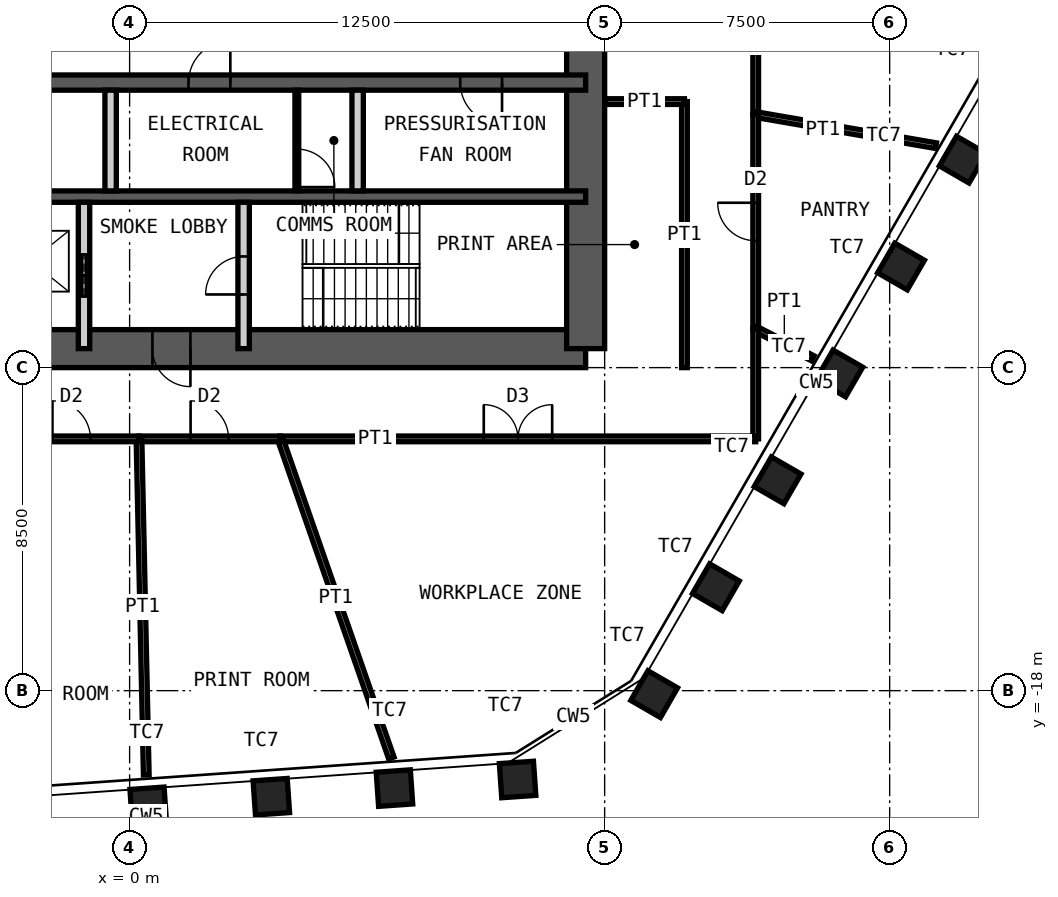
"""IFC4 building model, lengths in metres.
Left out: names, types, materials, properties, quantities, classifications, styles, units other than length and angle.
Written with IfcOpenShell. Run it as: python <this file> out.ifc"""

import sys

from ifc_helpers import new_model, si_unit, direction, frame, frame_2d, origin, origin_2d, place, context, subcontext, project, spatial, rectangle, hollow_rectangle, extrude, element, fill, save


model = new_model("IFC4")
c1 = context("Model", 3, precision=1e-05, world=origin(), true_north=direction((0.0, 1.0)))
c2 = subcontext(c1, "Body", "Model", "MODEL_VIEW")
j1 = project(units=[si_unit("LENGTHUNIT", "METRE"), si_unit("PLANEANGLEUNIT", "RADIAN")], contexts=[c1])
p1 = place(None, origin())
s1 = spatial("IfcSite", under=j1, at=p1, CompositionType="ELEMENT")
p2 = place(p1, origin())
s2 = spatial("IfcBuilding", under=s1, at=p2, CompositionType="ELEMENT")
p3 = place(p2, frame((0.0, 0.0, 266.2)))
s3 = spatial("IfcBuildingStorey", under=s2, at=p3, CompositionType="ELEMENT", Elevation=266.2)
for number, where, z_axis, x_axis in (
    (1, (21.924, -4.027, 0.0), (0.0, 0.0, 1.0), (0.5, 0.866, 0.0)),
    (2, (20.3, -6.84, 0.0), (0.0, 0.0, 1.0), (0.5, 0.866, 0.0)),
    (3, (18.676, -9.653, 0.0), (0.0, 0.0, 1.0), (0.5, 0.866, 0.0)),
    (4, (17.052, -12.466, 0.0), (0.0, 0.0, 1.0), (0.5, 0.866, 0.0)),
    (5, (15.427, -15.279, 0.0), (0.0, 0.0, 1.0), (0.5, 0.866, 0.0)),
    (6, (13.803, -18.092, 0.0), (0.0, 0.0, 1.0), (0.5, 0.866, 0.0)),
    (7, (10.209, -20.337, 0.0), (0.0, 0.0, 1.0), (0.998, 0.07, 0.0)),
    (8, (6.969, -20.564, 0.0), (0.0, 0.0, 1.0), (0.998, 0.07, 0.0)),
    (9, (3.729, -20.791, 0.0), (0.0, 0.0, 1.0), (0.998, 0.07, 0.0)),
    (10, (0.489, -21.017, 0.0), (0.0, 0.0, 1.0), (0.998, 0.07, 0.0)),
):
    element("IfcColumn", number, at=place(p3, frame(where, z_axis=z_axis, x_axis=x_axis)), inside=s3, PredefinedType="COLUMN", context=c2, shape_type="SweptSolid", body=[
        extrude(hollow_rectangle(XDim=0.9, YDim=0.9, WallThickness=0.06, at=origin_2d()), origin(), (0.0, 0.0, 1.0), 4.2),
    ])
p4 = place(p3, frame((-12.0, -9.0, 0.0), z_axis=(0.0, 0.0, 1.0), x_axis=(1.0, 0.0, 0.0)))
e11 = element("IfcWall", 11, at=p4, inside=s3, PredefinedType="SHEAR", context=c2, shape_type="SweptSolid", body=[
    extrude(rectangle(XDim=24.0, YDim=1.0, at=frame_2d((12.0, 0.0))), origin(), (0.0, 0.0, 1.0), 4.2),
])
p5 = place(p4, frame((1.35, 0.0, 0.0)))
e12 = element("IfcOpeningElement", 12, at=p5, cuts=e11, PredefinedType="OPENING", context=c2, shape_type="SweptSolid", body=[
    extrude(rectangle(XDim=1.0, YDim=2.1, at=frame_2d((0.5, 1.05))), frame((0.0, 0.51, 0.0), z_axis=(0.0, -1.0, 0.0), x_axis=(1.0, 0.0, 0.0)), (0.0, 0.0, 1.0), 1.02),
])
p6 = place(p4, frame((5.325, 0.0, 0.0)))
e13 = element("IfcOpeningElement", 13, at=p6, cuts=e11, PredefinedType="OPENING", context=c2, shape_type="SweptSolid", body=[
    extrude(rectangle(XDim=1.15, YDim=2.1, at=frame_2d((0.575, 1.05))), frame((0.0, 0.51, 0.0), z_axis=(0.0, -1.0, 0.0), x_axis=(1.0, 0.0, 0.0)), (0.0, 0.0, 1.0), 1.02),
])
p7 = place(p4, frame((12.6, 0.0, 0.0)))
e14 = element("IfcOpeningElement", 14, at=p7, cuts=e11, PredefinedType="OPENING", context=c2, shape_type="SweptSolid", body=[
    extrude(rectangle(XDim=1.0, YDim=2.1, at=frame_2d((0.5, 1.05))), frame((0.0, 0.51, 0.0), z_axis=(0.0, -1.0, 0.0), x_axis=(1.0, 0.0, 0.0)), (0.0, 0.0, 1.0), 1.02),
])
p8 = place(p3, frame((12.0, -9.0, 0.0), z_axis=(0.0, 0.0, 1.0), x_axis=(0.0, 1.0, 0.0)))
e15 = element("IfcWall", 15, at=p8, inside=s3, PredefinedType="SHEAR", context=c2, shape_type="SweptSolid", body=[
    extrude(rectangle(XDim=18.0, YDim=1.0, at=frame_2d((9.0, 0.0))), origin(), (0.0, 0.0, 1.0), 4.2),
])
p9 = place(p8, frame((8.1, 0.0, 0.0)))
e16 = element("IfcOpeningElement", 16, at=p9, cuts=e15, PredefinedType="OPENING", context=c2, shape_type="SweptSolid", body=[
    extrude(rectangle(XDim=1.8, YDim=2.1, at=frame_2d((0.9, 1.05))), frame((0.0, 0.51, 0.0), z_axis=(0.0, -1.0, 0.0), x_axis=(1.0, 0.0, 0.0)), (0.0, 0.0, 1.0), 1.02),
])
p10 = place(p3, frame((-12.0, -2.0, 0.0), z_axis=(0.0, 0.0, 1.0), x_axis=(1.0, 0.0, 0.0)))
e17 = element("IfcWall", 17, at=p10, inside=s3, PredefinedType="SHEAR", context=c2, shape_type="SweptSolid", body=[
    extrude(rectangle(XDim=24.0, YDim=0.4, at=frame_2d((12.0, 0.0))), origin(), (0.0, 0.0, 1.0), 4.2),
])
p11 = place(p10, frame((1.1, 0.0, 0.0)))
e18 = element("IfcOpeningElement", 18, at=p11, cuts=e17, PredefinedType="OPENING", context=c2, shape_type="SweptSolid", body=[
    extrude(rectangle(XDim=1.1, YDim=2.1, at=frame_2d((0.55, 1.05))), frame((0.0, 0.21, 0.0), z_axis=(0.0, -1.0, 0.0), x_axis=(1.0, 0.0, 0.0)), (0.0, 0.0, 1.0), 0.42),
])
p12 = place(p10, frame((13.55, 0.0, 0.0)))
e19 = element("IfcOpeningElement", 19, at=p12, cuts=e17, PredefinedType="OPENING", context=c2, shape_type="SweptSolid", body=[
    extrude(rectangle(XDim=1.1, YDim=2.1, at=frame_2d((0.55, 1.05))), frame((0.0, 0.21, 0.0), z_axis=(0.0, -1.0, 0.0), x_axis=(1.0, 0.0, 0.0)), (0.0, 0.0, 1.0), 0.42),
])
p13 = place(p10, frame((20.7, 0.0, 0.0)))
e20 = element("IfcOpeningElement", 20, at=p13, cuts=e17, PredefinedType="OPENING", context=c2, shape_type="SweptSolid", body=[
    extrude(rectangle(XDim=1.1, YDim=2.1, at=frame_2d((0.55, 1.05))), frame((0.0, 0.21, 0.0), z_axis=(0.0, -1.0, 0.0), x_axis=(1.0, 0.0, 0.0)), (0.0, 0.0, 1.0), 0.42),
])
p14 = place(p10, frame((4.0, 0.0, 0.0)))
e21 = element("IfcOpeningElement", 21, at=p14, cuts=e17, PredefinedType="OPENING", context=c2, shape_type="SweptSolid", body=[
    extrude(rectangle(XDim=1.0, YDim=2.1, at=frame_2d((0.5, 1.05))), frame((0.0, 0.21, 0.0), z_axis=(0.0, -1.0, 0.0), x_axis=(1.0, 0.0, 0.0)), (0.0, 0.0, 1.0), 0.42),
])
p15 = place(p10, frame((6.8, 0.0, 0.0)))
e22 = element("IfcOpeningElement", 22, at=p15, cuts=e17, PredefinedType="OPENING", context=c2, shape_type="SweptSolid", body=[
    extrude(rectangle(XDim=1.0, YDim=2.1, at=frame_2d((0.5, 1.05))), frame((0.0, 0.21, 0.0), z_axis=(0.0, -1.0, 0.0), x_axis=(1.0, 0.0, 0.0)), (0.0, 0.0, 1.0), 0.42),
])
p16 = place(p3, frame((-12.0, -5.0, 0.0), z_axis=(0.0, 0.0, 1.0), x_axis=(1.0, 0.0, 0.0)))
e23 = element("IfcWall", 23, at=p16, inside=s3, PredefinedType="SHEAR", context=c2, shape_type="SweptSolid", body=[
    extrude(rectangle(XDim=24.0, YDim=0.3, at=frame_2d((12.0, 0.0))), origin(), (0.0, 0.0, 1.0), 4.2),
])
for number, where, z_axis, x_axis in (
    (24, (-0.5, -4.85, 0.0), (0.0, 0.0, 1.0), (0.0, 1.0, 0.0)),
    (25, (6.0, -4.85, 0.0), (0.0, 0.0, 1.0), (0.0, 1.0, 0.0)),
):
    element("IfcWall", number, at=place(p3, frame(where, z_axis=z_axis, x_axis=x_axis)), inside=s3, PredefinedType="PARTITIONING", context=c2, shape_type="SweptSolid", body=[
        extrude(rectangle(XDim=2.65, YDim=0.3, at=frame_2d((1.325, 0.0))), origin(), (0.0, 0.0, 1.0), 3.98),
    ])
p17 = place(p3, frame((-1.2, -9.0, 0.0), z_axis=(0.0, 0.0, 1.0), x_axis=(0.0, 1.0, 0.0)))
e26 = element("IfcWall", 26, at=p17, inside=s3, PredefinedType="PARTITIONING", context=c2, shape_type="SweptSolid", body=[
    extrude(rectangle(XDim=3.85, YDim=0.3, at=frame_2d((1.925, 0.0))), origin(), (0.0, 0.0, 1.0), 3.98),
])
p18 = place(p17, frame((1.375, 0.0, 0.0)))
e27 = element("IfcOpeningElement", 27, at=p18, cuts=e26, PredefinedType="OPENING", context=c2, shape_type="SweptSolid", body=[
    extrude(rectangle(XDim=1.1, YDim=2.4, at=frame_2d((0.55, 1.2))), frame((0.0, 0.16, 0.0), z_axis=(0.0, -1.0, 0.0), x_axis=(1.0, 0.0, 0.0)), (0.0, 0.0, 1.0), 0.32),
])
p19 = place(p3, frame((3.0, -9.0, 0.0), z_axis=(0.0, 0.0, 1.0), x_axis=(0.0, 1.0, 0.0)))
e28 = element("IfcWall", 28, at=p19, inside=s3, PredefinedType="PARTITIONING", context=c2, shape_type="SweptSolid", body=[
    extrude(rectangle(XDim=3.85, YDim=0.3, at=frame_2d((1.925, 0.0))), origin(), (0.0, 0.0, 1.0), 3.98),
])
p20 = place(p19, frame((1.425, 0.0, 0.0)))
e29 = element("IfcOpeningElement", 29, at=p20, cuts=e28, PredefinedType="OPENING", context=c2, shape_type="SweptSolid", body=[
    extrude(rectangle(XDim=1.0, YDim=2.1, at=frame_2d((0.5, 1.05))), frame((0.0, 0.16, 0.0), z_axis=(0.0, -1.0, 0.0), x_axis=(1.0, 0.0, 0.0)), (0.0, 0.0, 1.0), 0.32),
])
p21 = place(p3, frame((4.4, -4.85, 0.0), z_axis=(0.0, 0.0, 1.0), x_axis=(0.0, 1.0, 0.0)))
e30 = element("IfcWall", 30, at=p21, inside=s3, PredefinedType="PARTITIONING", context=c2, shape_type="SweptSolid", body=[
    extrude(rectangle(XDim=2.65, YDim=0.1, at=frame_2d((1.325, 0.0))), origin(), (0.0, 0.0, 1.0), 3.98),
])
p22 = place(p21, frame((0.1, 0.0, 0.0)))
e31 = element("IfcOpeningElement", 31, at=p22, cuts=e30, PredefinedType="OPENING", context=c2, shape_type="SweptSolid", body=[
    extrude(rectangle(XDim=1.0, YDim=2.4, at=frame_2d((0.5, 1.2))), frame((0.0, 0.06, 0.0), z_axis=(0.0, -1.0, 0.0), x_axis=(1.0, 0.0, 0.0)), (0.0, 0.0, 1.0), 0.12),
])
p23 = place(p3, frame((16.475, 6.737, 0.0), z_axis=(0.0, 0.0, 1.0), x_axis=(0.0, -1.0, 0.0)))
e32 = element("IfcWall", 32, at=p23, inside=s3, PredefinedType="PARTITIONING", context=c2, shape_type="SweptSolid", body=[
    extrude(rectangle(XDim=9.578, YDim=0.15, at=frame_2d((4.789, 0.0))), origin(), (0.0, 0.0, 1.0), 4.03),
])
p24 = place(p23, frame((3.889, 0.0, 0.0)))
e33 = element("IfcOpeningElement", 33, at=p24, cuts=e32, PredefinedType="OPENING", context=c2, shape_type="SweptSolid", body=[
    extrude(rectangle(XDim=1.8, YDim=2.4, at=frame_2d((0.9, 1.2))), frame((0.0, 0.085, 0.0), z_axis=(0.0, -1.0, 0.0), x_axis=(1.0, 0.0, 0.0)), (0.0, 0.0, 1.0), 0.17),
])
p25 = place(p3, frame((21.219, -3.66, 0.0), z_axis=(0.0, 0.0, 1.0), x_axis=(-0.985444592587, 0.16999692627, 0.0)))
e34 = element("IfcWall", 34, at=p25, inside=s3, PredefinedType="PARTITIONING", context=c2, shape_type="SweptSolid", body=[
    extrude(rectangle(XDim=4.814, YDim=0.15, at=frame_2d((2.407, 0.0))), origin(), (0.0, 0.0, 1.0), 4.03),
])
p26 = place(p3, frame((16.475, -2.842, 0.0), z_axis=(0.0, 0.0, 1.0), x_axis=(0.0, -1.0, 0.0)))
e35 = element("IfcWall", 35, at=p26, inside=s3, PredefinedType="PARTITIONING", context=c2, shape_type="SweptSolid", body=[
    extrude(rectangle(XDim=5.64, YDim=0.15, at=frame_2d((2.82, 0.0))), origin(), (0.0, 0.0, 1.0), 4.03),
])
p27 = place(p26, frame((2.32, 0.0, 0.0)))
e36 = element("IfcOpeningElement", 36, at=p27, cuts=e35, PredefinedType="OPENING", context=c2, shape_type="SweptSolid", body=[
    extrude(rectangle(XDim=1.0, YDim=2.4, at=frame_2d((0.5, 1.2))), frame((0.0, 0.085, 0.0), z_axis=(0.0, -1.0, 0.0), x_axis=(1.0, 0.0, 0.0)), (0.0, 0.0, 1.0), 0.17),
])
p28 = place(p3, frame((17.98, -9.257, 0.0), z_axis=(0.0, 0.0, 1.0), x_axis=(-0.889058145064, 0.457794292991, 0.0)))
e37 = element("IfcWall", 37, at=p28, inside=s3, PredefinedType="PARTITIONING", context=c2, shape_type="SweptSolid", body=[
    extrude(rectangle(XDim=1.693, YDim=0.15, at=frame_2d((0.847, 0.0))), origin(), (0.0, 0.0, 1.0), 3.33),
])
p29 = place(p3, frame((16.475, -8.482, 0.0), z_axis=(0.0, 0.0, 1.0), x_axis=(0.0, -1.0, 0.0)))
e38 = element("IfcWall", 38, at=p29, inside=s3, PredefinedType="PARTITIONING", context=c2, shape_type="SweptSolid", body=[
    extrude(rectangle(XDim=2.893, YDim=0.15, at=frame_2d((1.447, 0.0))), origin(), (0.0, 0.0, 1.0), 4.03),
])
p30 = place(p3, frame((16.475, -11.375, 0.0), z_axis=(0.0, 0.0, 1.0), x_axis=(-1.0, 0.0, 0.0)))
e39 = element("IfcWall", 39, at=p30, inside=s3, PredefinedType="PARTITIONING", context=c2, shape_type="SweptSolid", body=[
    extrude(rectangle(XDim=12.512, YDim=0.15, at=frame_2d((6.256, 0.0))), origin(), (0.0, 0.0, 1.0), 4.03),
])
p31 = place(p30, frame((5.356, 0.0, 0.0)))
e40 = element("IfcOpeningElement", 40, at=p31, cuts=e39, PredefinedType="OPENING", context=c2, shape_type="SweptSolid", body=[
    extrude(rectangle(XDim=1.8, YDim=2.4, at=frame_2d((0.9, 1.2))), frame((0.0, 0.085, 0.0), z_axis=(0.0, -1.0, 0.0), x_axis=(1.0, 0.0, 0.0)), (0.0, 0.0, 1.0), 0.17),
])
p32 = place(p3, frame((6.888, -19.771, 0.0), z_axis=(0.0, 0.0, 1.0), x_axis=(-0.328983865825, 0.944335542075, 0.0)))
e41 = element("IfcWall", 41, at=p32, inside=s3, PredefinedType="PARTITIONING", context=c2, shape_type="SweptSolid", body=[
    extrude(rectangle(XDim=8.891, YDim=0.15, at=frame_2d((4.446, 0.0))), origin(), (0.0, 0.0, 1.0), 3.33),
])
p33 = place(p3, frame((3.963, -11.375, 0.0), z_axis=(0.0, 0.0, 1.0), x_axis=(-1.0, 0.0, 0.0)))
e42 = element("IfcWall", 42, at=p33, inside=s3, PredefinedType="PARTITIONING", context=c2, shape_type="SweptSolid", body=[
    extrude(rectangle(XDim=3.716, YDim=0.15, at=frame_2d((1.858, 0.0))), origin(), (0.0, 0.0, 1.0), 4.03),
])
p34 = place(p33, frame((1.358, 0.0, 0.0)))
e43 = element("IfcOpeningElement", 43, at=p34, cuts=e42, PredefinedType="OPENING", context=c2, shape_type="SweptSolid", body=[
    extrude(rectangle(XDim=1.0, YDim=2.4, at=frame_2d((0.5, 1.2))), frame((0.0, 0.085, 0.0), z_axis=(0.0, -1.0, 0.0), x_axis=(1.0, 0.0, 0.0)), (0.0, 0.0, 1.0), 0.17),
])
p35 = place(p3, frame((0.438, -20.219, 0.0), z_axis=(0.0, 0.0, 1.0), x_axis=(-0.021638042243, 0.999765870156, 0.0)))
e44 = element("IfcWall", 44, at=p35, inside=s3, PredefinedType="PARTITIONING", context=c2, shape_type="SweptSolid", body=[
    extrude(rectangle(XDim=8.846, YDim=0.15, at=frame_2d((4.423, 0.0))), origin(), (0.0, 0.0, 1.0), 3.33),
])
p36 = place(p3, frame((0.247, -11.375, 0.0), z_axis=(0.0, 0.0, 1.0), x_axis=(-1.0, 0.0, 0.0)))
e45 = element("IfcWall", 45, at=p36, inside=s3, PredefinedType="PARTITIONING", context=c2, shape_type="SweptSolid", body=[
    extrude(rectangle(XDim=3.554, YDim=0.15, at=frame_2d((1.777, 0.0))), origin(), (0.0, 0.0, 1.0), 4.03),
])
p37 = place(p36, frame((1.277, 0.0, 0.0)))
e46 = element("IfcOpeningElement", 46, at=p37, cuts=e45, PredefinedType="OPENING", context=c2, shape_type="SweptSolid", body=[
    extrude(rectangle(XDim=1.0, YDim=2.4, at=frame_2d((0.5, 1.2))), frame((0.0, 0.085, 0.0), z_axis=(0.0, -1.0, 0.0), x_axis=(1.0, 0.0, 0.0)), (0.0, 0.0, 1.0), 0.17),
])
p38 = place(p3, frame((14.6, -9.5, 0.0), z_axis=(0.0, 0.0, 1.0), x_axis=(0.0, 1.0, 0.0)))
e47 = element("IfcWall", 47, at=p38, inside=s3, PredefinedType="PARTITIONING", context=c2, shape_type="SweptSolid", body=[
    extrude(rectangle(XDim=7.0, YDim=0.15, at=frame_2d((3.5, 0.0))), origin(), (0.0, 0.0, 1.0), 4.03),
])
p39 = place(p3, frame((12.5, -2.5, 0.0), z_axis=(0.0, 0.0, 1.0), x_axis=(1.0, 0.0, 0.0)))
e48 = element("IfcWall", 48, at=p39, inside=s3, PredefinedType="PARTITIONING", context=c2, shape_type="SweptSolid", body=[
    extrude(rectangle(XDim=2.1, YDim=0.15, at=frame_2d((1.05, 0.0))), origin(), (0.0, 0.0, 1.0), 3.33),
])
p40 = place(p7, origin())
e49 = element("IfcDoor", 49, at=p40, inside=s3, OperationType="SINGLE_SWING_RIGHT", PredefinedType="DOOR", context=c2, shape_type="SweptSolid", body=[
    extrude(rectangle(XDim=1.0, YDim=2.1, at=frame_2d((0.5, 1.05))), frame((0.0, 0.025, 0.0), z_axis=(0.0, -1.0, 0.0), x_axis=(1.0, 0.0, 0.0)), (0.0, 0.0, 1.0), 0.05),
])
fill(e14, e49)
p41 = place(p20, origin())
e50 = element("IfcDoor", 50, at=p41, inside=s3, OperationType="SINGLE_SWING_RIGHT", PredefinedType="DOOR", context=c2, shape_type="SweptSolid", body=[
    extrude(rectangle(XDim=1.0, YDim=2.1, at=frame_2d((0.5, 1.05))), frame((0.0, 0.025, 0.0), z_axis=(0.0, -1.0, 0.0), x_axis=(1.0, 0.0, 0.0)), (0.0, 0.0, 1.0), 0.05),
])
fill(e29, e50)
p42 = place(p12, origin())
e51 = element("IfcDoor", 51, at=p42, inside=s3, OperationType="SINGLE_SWING_LEFT", PredefinedType="DOOR", context=c2, shape_type="SweptSolid", body=[
    extrude(rectangle(XDim=1.1, YDim=2.1, at=frame_2d((0.55, 1.05))), frame((0.0, 0.025, 0.0), z_axis=(0.0, -1.0, 0.0), x_axis=(1.0, 0.0, 0.0)), (0.0, 0.0, 1.0), 0.05),
])
fill(e19, e51)
p43 = place(p13, origin())
e52 = element("IfcDoor", 52, at=p43, inside=s3, OperationType="SINGLE_SWING_RIGHT", PredefinedType="DOOR", context=c2, shape_type="SweptSolid", body=[
    extrude(rectangle(XDim=1.1, YDim=2.1, at=frame_2d((0.55, 1.05))), frame((0.0, 0.025, 0.0), z_axis=(0.0, -1.0, 0.0), x_axis=(1.0, 0.0, 0.0)), (0.0, 0.0, 1.0), 0.05),
])
fill(e20, e52)
p44 = place(p18, origin())
e53 = element("IfcDoor", 53, at=p44, inside=s3, OperationType="DOUBLE_DOOR_SLIDING", PredefinedType="DOOR", context=c2, shape_type="SweptSolid", body=[
    extrude(rectangle(XDim=1.1, YDim=2.4, at=frame_2d((0.55, 1.2))), frame((0.0, 0.025, 0.0), z_axis=(0.0, -1.0, 0.0), x_axis=(1.0, 0.0, 0.0)), (0.0, 0.0, 1.0), 0.05),
])
fill(e27, e53)
p45 = place(p22, origin())
e54 = element("IfcDoor", 54, at=p45, inside=s3, OperationType="SINGLE_SWING_LEFT", PredefinedType="DOOR", context=c2, shape_type="SweptSolid", body=[
    extrude(rectangle(XDim=1.0, YDim=2.4, at=frame_2d((0.5, 1.2))), frame((0.0, 0.025, 0.0), z_axis=(0.0, -1.0, 0.0), x_axis=(1.0, 0.0, 0.0)), (0.0, 0.0, 1.0), 0.05),
])
fill(e31, e54)
p46 = place(p27, origin())
e55 = element("IfcDoor", 55, at=p46, inside=s3, OperationType="SINGLE_SWING_LEFT", PredefinedType="DOOR", context=c2, shape_type="SweptSolid", body=[
    extrude(rectangle(XDim=1.0, YDim=2.4, at=frame_2d((0.5, 1.2))), frame((0.0, 0.025, 0.0), z_axis=(0.0, -1.0, 0.0), x_axis=(1.0, 0.0, 0.0)), (0.0, 0.0, 1.0), 0.05),
])
fill(e36, e55)
p47 = place(p31, origin())
e56 = element("IfcDoor", 56, at=p47, inside=s3, OperationType="DOUBLE_DOOR_DOUBLE_SWING", PredefinedType="DOOR", context=c2, shape_type="SweptSolid", body=[
    extrude(rectangle(XDim=1.8, YDim=2.4, at=frame_2d((0.9, 1.2))), frame((0.0, 0.025, 0.0), z_axis=(0.0, -1.0, 0.0), x_axis=(1.0, 0.0, 0.0)), (0.0, 0.0, 1.0), 0.05),
])
fill(e40, e56)
p48 = place(p34, origin())
e57 = element("IfcDoor", 57, at=p48, inside=s3, OperationType="SINGLE_SWING_RIGHT", PredefinedType="DOOR", context=c2, shape_type="SweptSolid", body=[
    extrude(rectangle(XDim=1.0, YDim=2.4, at=frame_2d((0.5, 1.2))), frame((0.0, 0.025, 0.0), z_axis=(0.0, -1.0, 0.0), x_axis=(1.0, 0.0, 0.0)), (0.0, 0.0, 1.0), 0.05),
])
fill(e43, e57)
p49 = place(p37, origin())
e58 = element("IfcDoor", 58, at=p49, inside=s3, OperationType="SINGLE_SWING_RIGHT", PredefinedType="DOOR", context=c2, shape_type="SweptSolid", body=[
    extrude(rectangle(XDim=1.0, YDim=2.4, at=frame_2d((0.5, 1.2))), frame((0.0, 0.025, 0.0), z_axis=(0.0, -1.0, 0.0), x_axis=(1.0, 0.0, 0.0)), (0.0, 0.0, 1.0), 0.05),
])
fill(e46, e58)
save(model, sys.argv[1])
